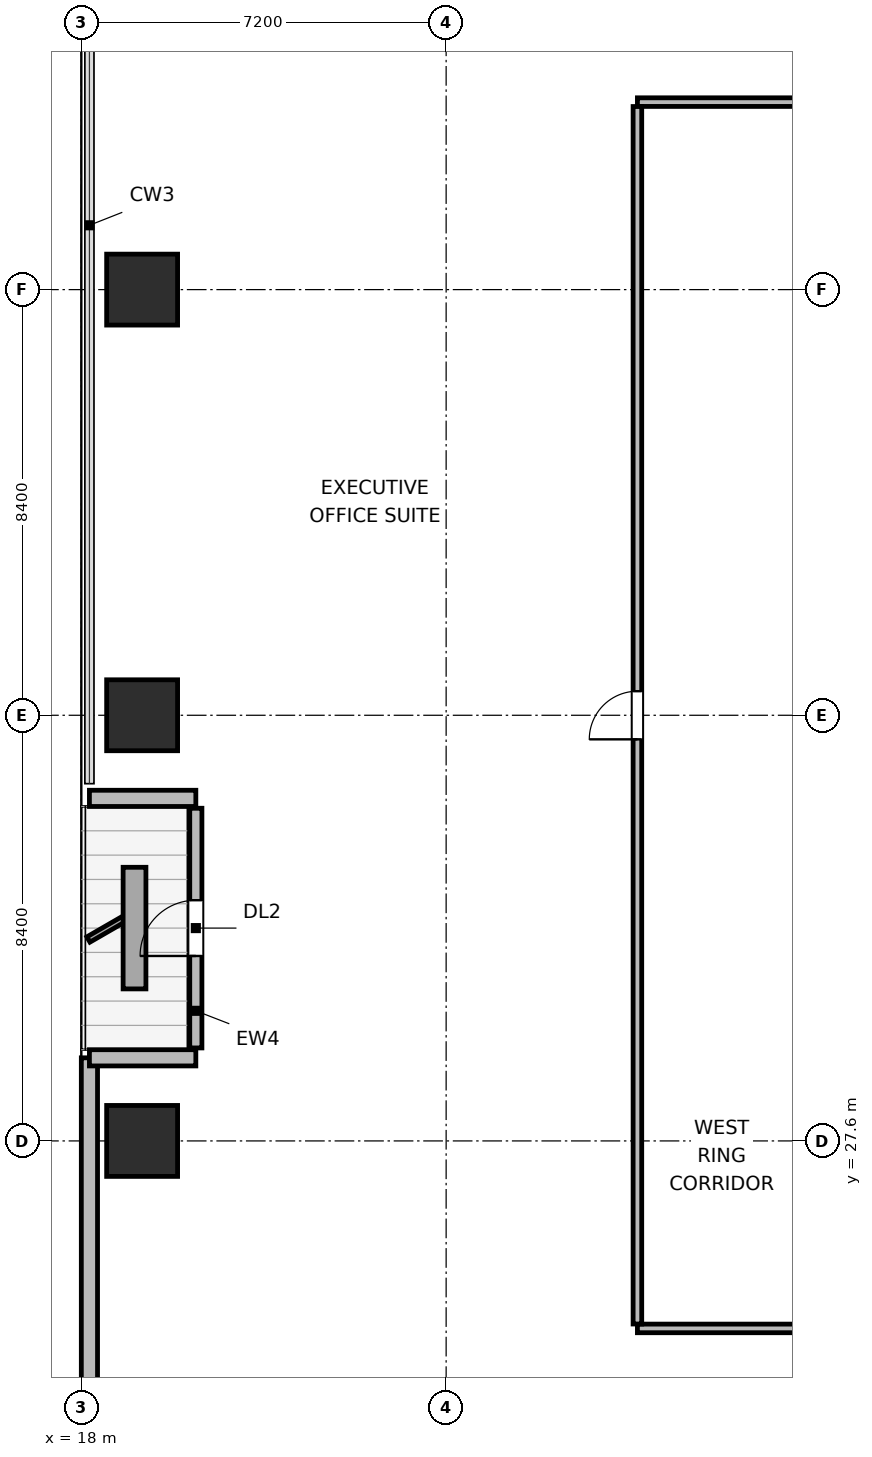
"""IFC4 building model, lengths in metres.
Left out: names, types, materials, properties, quantities, classifications, styles, units other than length and angle.
Written with IfcOpenShell. Run it as: python <this file> out.ifc"""

import sys

from ifc_helpers import new_model, si_unit, direction, frame, frame_2d, origin, origin_2d, place, context, subcontext, project, spatial, rectangle, extrude, element, fill, save


model = new_model("IFC4")
c1 = context("Model", 3, precision=1e-05, world=origin(), true_north=direction((0.0, 1.0)))
c2 = subcontext(c1, "Body", "Model", "MODEL_VIEW")
j1 = project(units=[si_unit("LENGTHUNIT", "METRE"), si_unit("PLANEANGLEUNIT", "RADIAN")], contexts=[c1])
p1 = place(None, origin())
s1 = spatial("IfcSite", under=j1, at=p1, CompositionType="ELEMENT")
p2 = place(p1, origin())
s2 = spatial("IfcBuilding", under=s1, at=p2, CompositionType="ELEMENT")
p3 = place(p2, frame((0.0, 0.0, 101.4)))
s3 = spatial("IfcBuildingStorey", under=s2, at=p3, CompositionType="ELEMENT", Elevation=101.4)
for number, where, z_axis, x_axis in (
    (1, (19.2, 27.6, 0.0), (0.0, 0.0, 1.0), (1.0, 0.0, 0.0)),
    (2, (19.2, 36.0, 0.0), (0.0, 0.0, 1.0), (1.0, 0.0, 0.0)),
    (3, (19.2, 44.4, 0.0), (0.0, 0.0, 1.0), (1.0, 0.0, 0.0)),
):
    element("IfcColumn", number, at=place(p3, frame(where, z_axis=z_axis, x_axis=x_axis)), inside=s3, PredefinedType="COLUMN", context=c2, shape_type="SweptSolid", body=[
        extrude(rectangle(XDim=1.4, YDim=1.4, at=origin_2d()), origin(), (0.0, 0.0, 1.0), 3.9),
    ])
p4 = place(p3, frame((18.16, 15.021, 0.0), z_axis=(0.0, 0.0, 1.0), x_axis=(0.0, 1.0, 0.0)))
e4 = element("IfcWall", 4, at=p4, inside=s3, PredefinedType="SOLIDWALL", context=c2, shape_type="SweptSolid", body=[
    extrude(rectangle(XDim=14.219, YDim=0.32, at=frame_2d((7.109, 0.0))), origin(), (0.0, 0.0, 1.0), 3.64),
])
p5 = place(p3, frame((18.16, 29.24, 0.0), z_axis=(0.0, 0.0, 1.0), x_axis=(1.0, 0.0, 0.0)))
e5 = element("IfcWall", 5, at=p5, inside=s3, PredefinedType="SOLIDWALL", context=c2, shape_type="SweptSolid", body=[
    extrude(rectangle(XDim=2.1, YDim=0.32, at=frame_2d((1.05, 0.0))), origin(), (0.0, 0.0, 1.0), 2.875),
])
p6 = place(p3, frame((20.26, 29.435, 0.0), z_axis=(0.0, 0.0, 1.0), x_axis=(0.0, 1.0, 0.0)))
e6 = element("IfcWall", 6, at=p6, inside=s3, PredefinedType="SOLIDWALL", context=c2, shape_type="SweptSolid", body=[
    extrude(rectangle(XDim=4.73, YDim=0.24, at=frame_2d((2.365, 0.0))), origin(), (0.0, 0.0, 1.0), 3.162),
])
p7 = place(p6, frame((1.815, 0.0, 0.0)))
e7 = element("IfcOpeningElement", 7, at=p7, cuts=e6, PredefinedType="OPENING", context=c2, shape_type="SweptSolid", body=[
    extrude(rectangle(XDim=1.1, YDim=2.04, at=frame_2d((0.55, 1.02))), frame((0.0, 0.13, 0.0), z_axis=(0.0, -1.0, 0.0), x_axis=(1.0, 0.0, 0.0)), (0.0, 0.0, 1.0), 0.26),
])
p8 = place(p3, frame((20.26, 34.36, 0.0), z_axis=(0.0, 0.0, 1.0), x_axis=(-1.0, 0.0, 0.0)))
e8 = element("IfcWall", 8, at=p8, inside=s3, PredefinedType="SOLIDWALL", context=c2, shape_type="SweptSolid", body=[
    extrude(rectangle(XDim=2.1, YDim=0.32, at=frame_2d((1.05, 0.0))), origin(), (0.0, 0.0, 1.0), 2.875),
])
p9 = place(p3, frame((28.975, 23.9, 0.0), z_axis=(0.0, 0.0, 1.0), x_axis=(1.0, 0.0, 0.0)))
e9 = element("IfcWall", 9, at=p9, inside=s3, PredefinedType="PARTITIONING", context=c2, shape_type="SweptSolid", body=[
    extrude(rectangle(XDim=38.05, YDim=0.17, at=frame_2d((19.025, 0.0))), origin(), (0.0, 0.0, 1.0), 3.64),
])
p10 = place(p9, frame((3.097, 0.0, 0.0)))
e10 = element("IfcOpeningElement", 10, at=p10, cuts=e9, PredefinedType="OPENING", context=c2, shape_type="SweptSolid", body=[
    extrude(rectangle(XDim=0.95, YDim=2.04, at=frame_2d((0.475, 1.02))), frame((0.0, 0.095, 0.0), z_axis=(0.0, -1.0, 0.0), x_axis=(1.0, 0.0, 0.0)), (0.0, 0.0, 1.0), 0.19),
])
p11 = place(p9, frame((9.64, 0.0, 0.0)))
e11 = element("IfcOpeningElement", 11, at=p11, cuts=e9, PredefinedType="OPENING", context=c2, shape_type="SweptSolid", body=[
    extrude(rectangle(XDim=0.95, YDim=2.04, at=frame_2d((0.475, 1.02))), frame((0.0, 0.095, 0.0), z_axis=(0.0, -1.0, 0.0), x_axis=(1.0, 0.0, 0.0)), (0.0, 0.0, 1.0), 0.19),
])
p12 = place(p9, frame((15.58, 0.0, 0.0)))
e12 = element("IfcOpeningElement", 12, at=p12, cuts=e9, PredefinedType="OPENING", context=c2, shape_type="SweptSolid", body=[
    extrude(rectangle(XDim=0.95, YDim=2.04, at=frame_2d((0.475, 1.02))), frame((0.0, 0.095, 0.0), z_axis=(0.0, -1.0, 0.0), x_axis=(1.0, 0.0, 0.0)), (0.0, 0.0, 1.0), 0.19),
])
p13 = place(p9, frame((21.52, 0.0, 0.0)))
e13 = element("IfcOpeningElement", 13, at=p13, cuts=e9, PredefinedType="OPENING", context=c2, shape_type="SweptSolid", body=[
    extrude(rectangle(XDim=0.95, YDim=2.04, at=frame_2d((0.475, 1.02))), frame((0.0, 0.095, 0.0), z_axis=(0.0, -1.0, 0.0), x_axis=(1.0, 0.0, 0.0)), (0.0, 0.0, 1.0), 0.19),
])
p14 = place(p9, frame((27.46, 0.0, 0.0)))
e14 = element("IfcOpeningElement", 14, at=p14, cuts=e9, PredefinedType="OPENING", context=c2, shape_type="SweptSolid", body=[
    extrude(rectangle(XDim=0.95, YDim=2.04, at=frame_2d((0.475, 1.02))), frame((0.0, 0.095, 0.0), z_axis=(0.0, -1.0, 0.0), x_axis=(1.0, 0.0, 0.0)), (0.0, 0.0, 1.0), 0.19),
])
p15 = place(p9, frame((34.003, 0.0, 0.0)))
e15 = element("IfcOpeningElement", 15, at=p15, cuts=e9, PredefinedType="OPENING", context=c2, shape_type="SweptSolid", body=[
    extrude(rectangle(XDim=0.95, YDim=2.04, at=frame_2d((0.475, 1.02))), frame((0.0, 0.095, 0.0), z_axis=(0.0, -1.0, 0.0), x_axis=(1.0, 0.0, 0.0)), (0.0, 0.0, 1.0), 0.19),
])
p16 = place(p3, frame((28.975, 48.1, 0.0), z_axis=(0.0, 0.0, 1.0), x_axis=(1.0, 0.0, 0.0)))
e16 = element("IfcWall", 16, at=p16, inside=s3, PredefinedType="PARTITIONING", context=c2, shape_type="SweptSolid", body=[
    extrude(rectangle(XDim=38.05, YDim=0.17, at=frame_2d((19.025, 0.0))), origin(), (0.0, 0.0, 1.0), 3.64),
])
p17 = place(p16, frame((4.923, 0.0, 0.0)))
e17 = element("IfcOpeningElement", 17, at=p17, cuts=e16, PredefinedType="OPENING", context=c2, shape_type="SweptSolid", body=[
    extrude(rectangle(XDim=0.95, YDim=2.04, at=frame_2d((0.475, 1.02))), frame((0.0, 0.095, 0.0), z_axis=(0.0, -1.0, 0.0), x_axis=(1.0, 0.0, 0.0)), (0.0, 0.0, 1.0), 0.19),
])
p18 = place(p16, frame((13.34, 0.0, 0.0)))
e18 = element("IfcOpeningElement", 18, at=p18, cuts=e16, PredefinedType="OPENING", context=c2, shape_type="SweptSolid", body=[
    extrude(rectangle(XDim=0.95, YDim=2.04, at=frame_2d((0.475, 1.02))), frame((0.0, 0.095, 0.0), z_axis=(0.0, -1.0, 0.0), x_axis=(1.0, 0.0, 0.0)), (0.0, 0.0, 1.0), 0.19),
])
p19 = place(p16, frame((20.06, 0.0, 0.0)))
e19 = element("IfcOpeningElement", 19, at=p19, cuts=e16, PredefinedType="OPENING", context=c2, shape_type="SweptSolid", body=[
    extrude(rectangle(XDim=0.95, YDim=2.04, at=frame_2d((0.475, 1.02))), frame((0.0, 0.095, 0.0), z_axis=(0.0, -1.0, 0.0), x_axis=(1.0, 0.0, 0.0)), (0.0, 0.0, 1.0), 0.19),
])
p20 = place(p16, frame((25.27, 0.0, 0.0)))
e20 = element("IfcOpeningElement", 20, at=p20, cuts=e16, PredefinedType="OPENING", context=c2, shape_type="SweptSolid", body=[
    extrude(rectangle(XDim=0.95, YDim=2.04, at=frame_2d((0.475, 1.02))), frame((0.0, 0.095, 0.0), z_axis=(0.0, -1.0, 0.0), x_axis=(1.0, 0.0, 0.0)), (0.0, 0.0, 1.0), 0.19),
])
p21 = place(p16, frame((32.178, 0.0, 0.0)))
e21 = element("IfcOpeningElement", 21, at=p21, cuts=e16, PredefinedType="OPENING", context=c2, shape_type="SweptSolid", body=[
    extrude(rectangle(XDim=0.95, YDim=2.04, at=frame_2d((0.475, 1.02))), frame((0.0, 0.095, 0.0), z_axis=(0.0, -1.0, 0.0), x_axis=(1.0, 0.0, 0.0)), (0.0, 0.0, 1.0), 0.19),
])
p22 = place(p3, frame((28.975, 23.987, 0.0), z_axis=(0.0, 0.0, 1.0), x_axis=(0.0, 1.0, 0.0)))
e22 = element("IfcWall", 22, at=p22, inside=s3, PredefinedType="PARTITIONING", context=c2, shape_type="SweptSolid", body=[
    extrude(rectangle(XDim=24.026, YDim=0.17, at=frame_2d((12.013, 0.0))), origin(), (0.0, 0.0, 1.0), 3.64),
])
p23 = place(p22, frame((11.538, 0.0, 0.0)))
e23 = element("IfcOpeningElement", 23, at=p23, cuts=e22, PredefinedType="OPENING", context=c2, shape_type="SweptSolid", body=[
    extrude(rectangle(XDim=0.95, YDim=2.04, at=frame_2d((0.475, 1.02))), frame((0.0, 0.095, 0.0), z_axis=(0.0, -1.0, 0.0), x_axis=(1.0, 0.0, 0.0)), (0.0, 0.0, 1.0), 0.19),
])
p24 = place(p7, origin())
e24 = element("IfcDoor", 24, at=p24, inside=s3, OperationType="SINGLE_SWING_LEFT", PredefinedType="DOOR", context=c2, shape_type="SweptSolid", body=[
    extrude(rectangle(XDim=1.1, YDim=2.04, at=frame_2d((0.55, 1.02))), frame((0.0, 0.025, 0.0), z_axis=(0.0, -1.0, 0.0), x_axis=(1.0, 0.0, 0.0)), (0.0, 0.0, 1.0), 0.05),
])
fill(e7, e24)
p25 = place(p23, origin())
e25 = element("IfcDoor", 25, at=p25, inside=s3, OperationType="SINGLE_SWING_LEFT", PredefinedType="DOOR", context=c2, shape_type="SweptSolid", body=[
    extrude(rectangle(XDim=0.95, YDim=2.04, at=frame_2d((0.475, 1.02))), frame((0.0, 0.025, 0.0), z_axis=(0.0, -1.0, 0.0), x_axis=(1.0, 0.0, 0.0)), (0.0, 0.0, 1.0), 0.05),
])
fill(e23, e25)
save(model, sys.argv[1])
